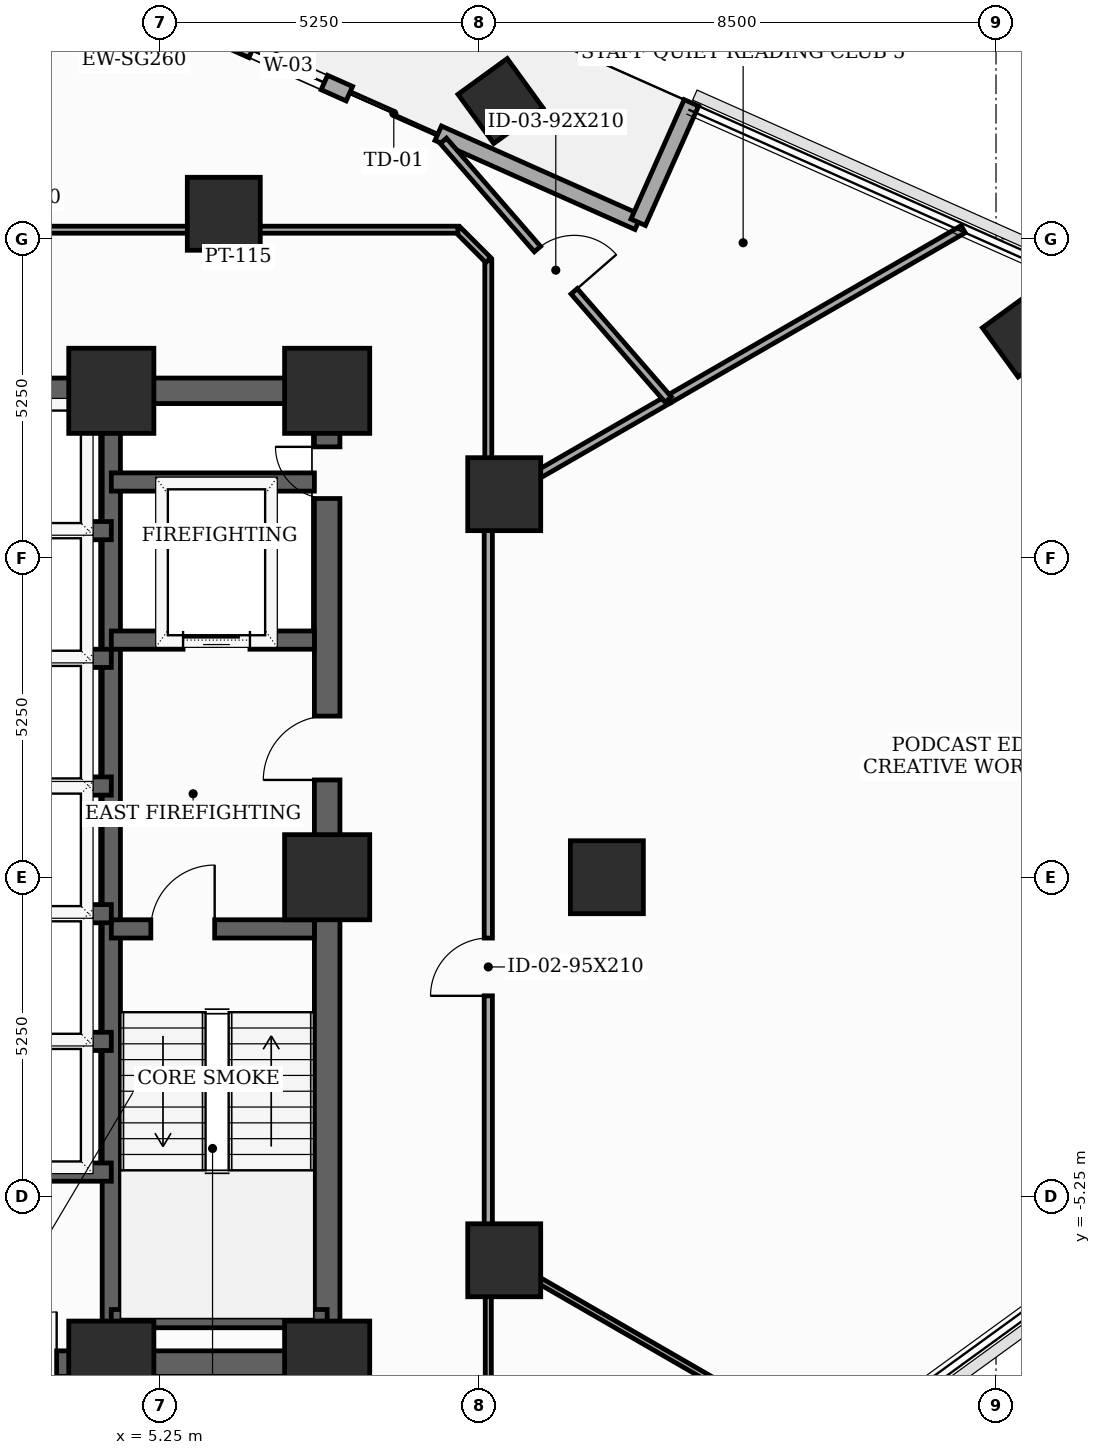
"""IFC4 building model, lengths in metres.
Left out: names, types, materials, properties, quantities, classifications, styles, units other than length and angle.
Written with IfcOpenShell. Run it as: python <this file> out.ifc"""

import sys

from ifc_helpers import new_model, si_unit, direction, frame, frame_2d, origin, origin_2d, place, context, subcontext, project, spatial, rectangle, extrude, element, fill, save


model = new_model("IFC4")
c1 = context("Model", 3, precision=1e-05, world=origin(), true_north=direction((0.0, 1.0)))
c2 = subcontext(c1, "Body", "Model", "MODEL_VIEW")
j1 = project(units=[si_unit("LENGTHUNIT", "METRE"), si_unit("PLANEANGLEUNIT", "RADIAN")], contexts=[c1])
p1 = place(None, origin())
s1 = spatial("IfcSite", under=j1, at=p1, CompositionType="ELEMENT")
p2 = place(p1, origin())
s2 = spatial("IfcBuilding", under=s1, at=p2, CompositionType="ELEMENT")
p3 = place(p2, frame((0.0, 0.0, 176.8)))
s3 = spatial("IfcBuildingStorey", under=s2, at=p3, CompositionType="ELEMENT", Elevation=176.8)
for number, where, z_axis, x_axis in (
    (1, (4.45, -8.0, 0.0), (0.0, 0.0, 1.0), (1.0, 0.0, 0.0)),
    (2, (8.0, -8.0, 0.0), (0.0, 0.0, 1.0), (1.0, 0.0, 0.0)),
    (3, (8.0, 0.0, 0.0), (0.0, 0.0, 1.0), (1.0, 0.0, 0.0)),
    (4, (8.0, 8.0, 0.0), (0.0, 0.0, 1.0), (1.0, 0.0, 0.0)),
    (5, (4.45, 8.0, 0.0), (0.0, 0.0, 1.0), (1.0, 0.0, 0.0)),
):
    element("IfcColumn", number, at=place(p3, frame(where, z_axis=z_axis, x_axis=x_axis)), inside=s3, PredefinedType="COLUMN", context=c2, shape_type="SweptSolid", body=[
        extrude(rectangle(XDim=1.4, YDim=1.4, at=origin_2d()), origin(), (0.0, 0.0, 1.0), 3.7),
    ])
for number, where, z_axis, x_axis in (
    (6, (12.6, 0.0, 0.0), (0.0, 0.0, 1.0), (1.0, 0.0, 0.0)),
    (7, (10.912, 6.3, 0.0), (0.0, 0.0, 1.0), (1.0, 0.0, 0.0)),
    (8, (6.3, 10.912, 0.0), (0.0, 0.0, 1.0), (1.0, 0.0, 0.0)),
    (9, (10.912, -6.3, 0.0), (0.0, 0.0, 1.0), (1.0, 0.0, 0.0)),
):
    element("IfcColumn", number, at=place(p3, frame(where, z_axis=z_axis, x_axis=x_axis)), inside=s3, PredefinedType="COLUMN", context=c2, shape_type="SweptSolid", body=[
        extrude(rectangle(XDim=1.2, YDim=1.2, at=origin_2d()), origin(), (0.0, 0.0, 1.0), 3.7),
    ])
for number, where, z_axis, x_axis in (
    (10, (19.474, 8.926, 0.0), (0.0, 0.0, 1.0), (0.809, 0.588, 0.0)),
    (11, (10.85, 12.766, 0.0), (0.0, 0.0, 1.0), (0.809, 0.588, 0.0)),
):
    element("IfcColumn", number, at=place(p3, frame(where, z_axis=z_axis, x_axis=x_axis)), inside=s3, PredefinedType="COLUMN", context=c2, shape_type="SweptSolid", body=[
        extrude(rectangle(XDim=1.0, YDim=1.0, at=origin_2d()), origin(), (0.0, 0.0, 1.0), 3.7),
    ])
p4 = place(p3, frame((13.115, 10.772, 0.0), z_axis=(0.0, 0.0, 1.0), x_axis=(-0.913545683247, 0.406736136359, 0.0)))
e12 = element("IfcWall", 12, at=p4, inside=s3, PredefinedType="SOLIDWALL", context=c2, shape_type="SweptSolid", body=[
    extrude(rectangle(XDim=10.8, YDim=0.26, at=frame_2d((5.4, 0.0))), origin(), (0.0, 0.0, 1.0), 3.5),
])
p5 = place(p4, frame((3.6, 0.0, 0.0)))
e13 = element("IfcOpeningElement", 13, at=p5, cuts=e12, PredefinedType="OPENING", context=c2, shape_type="SweptSolid", body=[
    extrude(rectangle(XDim=1.6, YDim=2.08, at=frame_2d((0.8, 1.04))), frame((0.0, 0.14, 0.0), z_axis=(0.0, -1.0, 0.0), x_axis=(1.0, 0.0, 0.0)), (0.0, 0.0, 1.0), 0.28),
])
p6 = place(p4, frame((5.65, 0.0, 0.85)))
e14 = element("IfcOpeningElement", 14, at=p6, cuts=e12, PredefinedType="OPENING", context=c2, shape_type="SweptSolid", body=[
    extrude(rectangle(XDim=1.3, YDim=1.25, at=frame_2d((0.65, 0.625))), frame((0.0, 0.14, 0.0), z_axis=(0.0, -1.0, 0.0), x_axis=(1.0, 0.0, 0.0)), (0.0, 0.0, 1.0), 0.28),
])
p7 = place(p3, frame((13.99, 12.736, 0.0), z_axis=(0.0, 0.0, 1.0), x_axis=(-0.406654684815, -0.913581943406, 0.0)))
e15 = element("IfcWall", 15, at=p7, inside=s3, PredefinedType="SOLIDWALL", context=c2, shape_type="SweptSolid", body=[
    extrude(rectangle(XDim=2.15, YDim=0.26, at=frame_2d((1.075, 0.0))), origin(), (0.0, 0.0, 1.0), 3.5),
])
p8 = place(p3, frame((8.0, -8.0, 0.0), z_axis=(0.0, 0.0, 1.0), x_axis=(0.0, 1.0, 0.0)))
e16 = element("IfcWall", 16, at=p8, inside=s3, PredefinedType="SHEAR", context=c2, shape_type="SweptSolid", body=[
    extrude(rectangle(XDim=16.0, YDim=0.42, at=frame_2d((8.0, 0.0))), origin(), (0.0, 0.0, 1.0), 3.5),
])
p9 = place(p8, frame((9.6, 0.0, 0.0)))
e17 = element("IfcOpeningElement", 17, at=p9, cuts=e16, PredefinedType="OPENING", context=c2, shape_type="SweptSolid", body=[
    extrude(rectangle(XDim=1.05, YDim=2.15, at=frame_2d((0.525, 1.075))), frame((0.0, 0.22, 0.0), z_axis=(0.0, -1.0, 0.0), x_axis=(1.0, 0.0, 0.0)), (0.0, 0.0, 1.0), 0.44),
])
p10 = place(p8, frame((14.229, 0.0, 0.0)))
e18 = element("IfcOpeningElement", 18, at=p10, cuts=e16, PredefinedType="OPENING", context=c2, shape_type="SweptSolid", body=[
    extrude(rectangle(XDim=0.85, YDim=2.02, at=frame_2d((0.425, 1.01))), frame((0.0, 0.22, 0.0), z_axis=(0.0, -1.0, 0.0), x_axis=(1.0, 0.0, 0.0)), (0.0, 0.0, 1.0), 0.44),
])
p11 = place(p3, frame((-8.0, -8.0, 0.0), z_axis=(0.0, 0.0, 1.0), x_axis=(1.0, 0.0, 0.0)))
e19 = element("IfcWall", 19, at=p11, inside=s3, PredefinedType="SHEAR", context=c2, shape_type="SweptSolid", body=[
    extrude(rectangle(XDim=16.0, YDim=0.42, at=frame_2d((8.0, 0.0))), origin(), (0.0, 0.0, 1.0), 3.5),
])
p12 = place(p11, frame((4.449, 0.0, 0.0)))
e20 = element("IfcOpeningElement", 20, at=p12, cuts=e19, PredefinedType="OPENING", context=c2, shape_type="SweptSolid", body=[
    extrude(rectangle(XDim=0.85, YDim=2.02, at=frame_2d((0.425, 1.01))), frame((0.0, 0.22, 0.0), z_axis=(0.0, -1.0, 0.0), x_axis=(1.0, 0.0, 0.0)), (0.0, 0.0, 1.0), 0.44),
])
p13 = place(p11, frame((6.49, 0.0, 0.0)))
e21 = element("IfcOpeningElement", 21, at=p13, cuts=e19, PredefinedType="OPENING", context=c2, shape_type="SweptSolid", body=[
    extrude(rectangle(XDim=0.85, YDim=2.02, at=frame_2d((0.425, 1.01))), frame((0.0, 0.22, 0.0), z_axis=(0.0, -1.0, 0.0), x_axis=(1.0, 0.0, 0.0)), (0.0, 0.0, 1.0), 0.44),
])
p14 = place(p11, frame((8.69, 0.0, 0.0)))
e22 = element("IfcOpeningElement", 22, at=p14, cuts=e19, PredefinedType="OPENING", context=c2, shape_type="SweptSolid", body=[
    extrude(rectangle(XDim=0.85, YDim=2.02, at=frame_2d((0.425, 1.01))), frame((0.0, 0.22, 0.0), z_axis=(0.0, -1.0, 0.0), x_axis=(1.0, 0.0, 0.0)), (0.0, 0.0, 1.0), 0.44),
])
p15 = place(p11, frame((10.701, 0.0, 0.0)))
e23 = element("IfcOpeningElement", 23, at=p15, cuts=e19, PredefinedType="OPENING", context=c2, shape_type="SweptSolid", body=[
    extrude(rectangle(XDim=0.85, YDim=2.02, at=frame_2d((0.425, 1.01))), frame((0.0, 0.22, 0.0), z_axis=(0.0, -1.0, 0.0), x_axis=(1.0, 0.0, 0.0)), (0.0, 0.0, 1.0), 0.44),
])
p16 = place(p3, frame((-8.0, 8.0, 0.0), z_axis=(0.0, 0.0, 1.0), x_axis=(1.0, 0.0, 0.0)))
e24 = element("IfcWall", 24, at=p16, inside=s3, PredefinedType="SHEAR", context=c2, shape_type="SweptSolid", body=[
    extrude(rectangle(XDim=16.0, YDim=0.42, at=frame_2d((8.0, 0.0))), origin(), (0.0, 0.0, 1.0), 3.5),
])
p17 = place(p16, frame((7.1, 0.0, 0.0)))
e25 = element("IfcOpeningElement", 25, at=p17, cuts=e24, PredefinedType="OPENING", context=c2, shape_type="SweptSolid", body=[
    extrude(rectangle(XDim=1.8, YDim=2.15, at=frame_2d((0.9, 1.075))), frame((0.0, 0.22, 0.0), z_axis=(0.0, -1.0, 0.0), x_axis=(1.0, 0.0, 0.0)), (0.0, 0.0, 1.0), 0.44),
])
p18 = place(p3, frame((4.45, -7.79, 0.0), z_axis=(0.0, 0.0, 1.0), x_axis=(0.0, 1.0, 0.0)))
e26 = element("IfcWall", 26, at=p18, inside=s3, PredefinedType="SHEAR", context=c2, shape_type="SweptSolid", body=[
    extrude(rectangle(XDim=15.58, YDim=0.3, at=frame_2d((7.79, 0.0))), origin(), (0.0, 0.0, 1.0), 3.5),
])
p19 = place(p3, frame((4.45, -0.85, 0.0), z_axis=(0.0, 0.0, 1.0), x_axis=(1.0, 0.0, 0.0)))
e27 = element("IfcWall", 27, at=p19, inside=s3, PredefinedType="SHEAR", context=c2, shape_type="SweptSolid", body=[
    extrude(rectangle(XDim=3.34, YDim=0.3, at=frame_2d((1.67, 0.0))), origin(), (0.0, 0.0, 1.0), 3.5),
])
p20 = place(p19, frame((0.65, 0.0, 0.0)))
e28 = element("IfcOpeningElement", 28, at=p20, cuts=e27, PredefinedType="OPENING", context=c2, shape_type="SweptSolid", body=[
    extrude(rectangle(XDim=1.05, YDim=2.15, at=frame_2d((0.525, 1.075))), frame((0.0, 0.16, 0.0), z_axis=(0.0, -1.0, 0.0), x_axis=(1.0, 0.0, 0.0)), (0.0, 0.0, 1.0), 0.32),
])
p21 = place(p3, frame((4.45, -7.26, 0.0), z_axis=(0.0, 0.0, 1.0), x_axis=(1.0, 0.0, 0.0)))
e29 = element("IfcWall", 29, at=p21, inside=s3, PredefinedType="SHEAR", context=c2, shape_type="SweptSolid", body=[
    extrude(rectangle(XDim=3.55, YDim=0.3, at=frame_2d((1.775, 0.0))), origin(), (0.0, 0.0, 1.0), 3.5),
])
p22 = place(p3, frame((4.45, 3.9, 0.0), z_axis=(0.0, 0.0, 1.0), x_axis=(1.0, 0.0, 0.0)))
e30 = element("IfcWall", 30, at=p22, inside=s3, PredefinedType="SHEAR", context=c2, shape_type="SweptSolid", body=[
    extrude(rectangle(XDim=3.34, YDim=0.3, at=frame_2d((1.67, 0.0))), origin(), (0.0, 0.0, 1.0), 3.5),
])
p23 = place(p22, frame((1.18, 0.0, 0.0)))
e31 = element("IfcOpeningElement", 31, at=p23, cuts=e30, PredefinedType="OPENING", context=c2, shape_type="SweptSolid", body=[
    extrude(rectangle(XDim=1.1, YDim=2.1, at=frame_2d((0.55, 1.05))), frame((0.0, 0.16, 0.0), z_axis=(0.0, -1.0, 0.0), x_axis=(1.0, 0.0, 0.0)), (0.0, 0.0, 1.0), 0.32),
])
p24 = place(p3, frame((4.45, 6.5, 0.0), z_axis=(0.0, 0.0, 1.0), x_axis=(1.0, 0.0, 0.0)))
e32 = element("IfcWall", 32, at=p24, inside=s3, PredefinedType="SHEAR", context=c2, shape_type="SweptSolid", body=[
    extrude(rectangle(XDim=3.34, YDim=0.3, at=frame_2d((1.67, 0.0))), origin(), (0.0, 0.0, 1.0), 3.5),
])
p25 = place(p3, frame((-4.45, -4.85, 0.0), z_axis=(0.0, 0.0, 1.0), x_axis=(1.0, 0.0, 0.0)))
e33 = element("IfcWall", 33, at=p25, inside=s3, PredefinedType="SHEAR", context=c2, shape_type="SweptSolid", body=[
    extrude(rectangle(XDim=8.9, YDim=0.3, at=frame_2d((4.45, 0.0))), origin(), (0.0, 0.0, 1.0), 3.5),
])
for number, where, z_axis, x_axis in (
    (34, (1.68, 1.5, 0.0), (0.0, 0.0, 1.0), (1.0, 0.0, 0.0)),
    (35, (1.68, 3.6, 0.0), (0.0, 0.0, 1.0), (1.0, 0.0, 0.0)),
    (36, (1.68, 5.7, 0.0), (0.0, 0.0, 1.0), (1.0, 0.0, 0.0)),
    (37, (1.68, -2.7, 0.0), (0.0, 0.0, 1.0), (1.0, 0.0, 0.0)),
    (38, (1.68, -0.6, 0.0), (0.0, 0.0, 1.0), (1.0, 0.0, 0.0)),
):
    element("IfcWall", number, at=place(p3, frame(where, z_axis=z_axis, x_axis=x_axis)), inside=s3, PredefinedType="SHEAR", context=c2, shape_type="SweptSolid", body=[
        extrude(rectangle(XDim=2.77, YDim=0.3, at=frame_2d((1.385, 0.0))), origin(), (0.0, 0.0, 1.0), 3.5),
    ])
p26 = place(p3, frame((10.65, -10.15, 0.0), z_axis=(0.0, 0.0, 1.0), x_axis=(0.0, 1.0, 0.0)))
e39 = element("IfcWall", 39, at=p26, inside=s3, PredefinedType="MOVABLE", context=c2, shape_type="SweptSolid", body=[
    extrude(rectangle(XDim=4.001, YDim=0.1, at=frame_2d((2.0, 0.0))), origin(), (0.0, 0.0, 1.0), 2.885),
])
p27 = place(p26, frame((0.66, 0.0, 0.0)))
e40 = element("IfcOpeningElement", 40, at=p27, cuts=e39, PredefinedType="OPENING", context=c2, shape_type="SweptSolid", body=[
    extrude(rectangle(XDim=0.92, YDim=2.1, at=frame_2d((0.46, 1.05))), frame((0.0, 0.06, 0.0), z_axis=(0.0, -1.0, 0.0), x_axis=(1.0, 0.0, 0.0)), (0.0, 0.0, 1.0), 0.12),
])
p28 = place(p3, frame((10.65, -6.149, 0.0), z_axis=(0.0, 0.0, 1.0), x_axis=(0.0, 1.0, 0.0)))
e41 = element("IfcWall", 41, at=p28, inside=s3, PredefinedType="PARTITIONING", context=c2, shape_type="SweptSolid", body=[
    extrude(rectangle(XDim=12.298, YDim=0.135, at=frame_2d((6.149, 0.0))), origin(), (0.0, 0.0, 1.0), 2.885),
])
p29 = place(p28, frame((4.198, 0.0, 0.0)))
e42 = element("IfcOpeningElement", 42, at=p29, cuts=e41, PredefinedType="OPENING", context=c2, shape_type="SweptSolid", body=[
    extrude(rectangle(XDim=0.95, YDim=2.1, at=frame_2d((0.475, 1.05))), frame((0.0, 0.077, 0.0), z_axis=(0.0, -1.0, 0.0), x_axis=(1.0, 0.0, 0.0)), (0.0, 0.0, 1.0), 0.155),
])
p30 = place(p3, frame((10.65, 6.149, 0.0), z_axis=(0.0, 0.0, 1.0), x_axis=(0.0, 1.0, 0.0)))
e43 = element("IfcWall", 43, at=p30, inside=s3, PredefinedType="PARTITIONING", context=c2, shape_type="SweptSolid", body=[
    extrude(rectangle(XDim=4.001, YDim=0.115, at=frame_2d((2.0, 0.0))), origin(), (0.0, 0.0, 1.0), 2.885),
])
p31 = place(p3, frame((10.65, 10.15, 0.0), z_axis=(0.0, 0.0, 1.0), x_axis=(-0.707106781187, 0.707106781187, 0.0)))
e44 = element("IfcWall", 44, at=p31, inside=s3, PredefinedType="PARTITIONING", context=c2, shape_type="SweptSolid", body=[
    extrude(rectangle(XDim=0.707, YDim=0.115, at=frame_2d((0.354, 0.0))), origin(), (0.0, 0.0, 1.0), 3.5),
])
p32 = place(p3, frame((10.15, 10.65, 0.0), z_axis=(0.0, 0.0, 1.0), x_axis=(-1.0, 0.0, 0.0)))
e45 = element("IfcWall", 45, at=p32, inside=s3, PredefinedType="PARTITIONING", context=c2, shape_type="SweptSolid", body=[
    extrude(rectangle(XDim=12.414, YDim=0.115, at=frame_2d((6.207, 0.0))), origin(), (0.0, 0.0, 1.0), 2.885),
])
p33 = place(p32, frame((7.222, 0.0, 0.0)))
e46 = element("IfcOpeningElement", 46, at=p33, cuts=e45, PredefinedType="OPENING", context=c2, shape_type="SweptSolid", body=[
    extrude(rectangle(XDim=0.95, YDim=2.1, at=frame_2d((0.475, 1.05))), frame((0.0, 0.067, 0.0), z_axis=(0.0, -1.0, 0.0), x_axis=(1.0, 0.0, 0.0)), (0.0, 0.0, 1.0), 0.135),
])
p34 = place(p3, frame((16.348, -9.439, 0.0), z_axis=(0.0, 0.0, 1.0), x_axis=(-0.866015045157, 0.50001794124, 0.0)))
e47 = element("IfcWall", 47, at=p34, inside=s3, PredefinedType="MOVABLE", context=c2, shape_type="SweptSolid", body=[
    extrude(rectangle(XDim=6.58, YDim=0.1, at=frame_2d((3.29, 0.0))), origin(), (0.0, 0.0, 1.0), 2.885),
])
p35 = place(p3, frame((18.46, 10.658, 0.0), z_axis=(0.0, 0.0, 1.0), x_axis=(-0.865978736514, -0.500080821373, 0.0)))
e48 = element("IfcWall", 48, at=p35, inside=s3, PredefinedType="PARTITIONING", context=c2, shape_type="SweptSolid", body=[
    extrude(rectangle(XDim=5.602, YDim=0.135, at=frame_2d((2.801, 0.0))), origin(), (0.0, 0.0, 1.0), 2.985),
])
p36 = place(p3, frame((13.609, 7.857, 0.0), z_axis=(0.0, 0.0, 1.0), x_axis=(-0.866071357471, -0.499920397431, 0.0)))
e49 = element("IfcWall", 49, at=p36, inside=s3, PredefinedType="PARTITIONING", context=c2, shape_type="SweptSolid", body=[
    extrude(rectangle(XDim=3.417, YDim=0.135, at=frame_2d((1.708, 0.0))), origin(), (0.0, 0.0, 1.0), 2.885),
])
p37 = place(p3, frame((9.911, 12.111, 0.0), z_axis=(0.0, 0.0, 1.0), x_axis=(0.656029654943, -0.754735113689, 0.0)))
e50 = element("IfcWall", 50, at=p37, inside=s3, PredefinedType="PARTITIONING", context=c2, shape_type="SweptSolid", body=[
    extrude(rectangle(XDim=5.637, YDim=0.135, at=frame_2d((2.818, 0.0))), origin(), (0.0, 0.0, 1.0), 3.5),
])
p38 = place(p37, frame((2.358, 0.0, 0.0)))
e51 = element("IfcOpeningElement", 51, at=p38, cuts=e50, PredefinedType="OPENING", context=c2, shape_type="SweptSolid", body=[
    extrude(rectangle(XDim=0.92, YDim=2.1, at=frame_2d((0.46, 1.05))), frame((0.0, 0.077, 0.0), z_axis=(0.0, -1.0, 0.0), x_axis=(1.0, 0.0, 0.0)), (0.0, 0.0, 1.0), 0.155),
])
p39 = place(p5, frame((1.6, 0.0, 0.0), z_axis=(0.0, 0.0, 1.0), x_axis=(-1.0, 0.0, 0.0)))
e52 = element("IfcDoor", 52, at=p39, inside=s3, OperationType="DOUBLE_DOOR_SLIDING", PredefinedType="DOOR", context=c2, shape_type="SweptSolid", body=[
    extrude(rectangle(XDim=1.6, YDim=2.08, at=frame_2d((0.8, 1.04))), frame((0.0, 0.025, 0.0), z_axis=(0.0, -1.0, 0.0), x_axis=(1.0, 0.0, 0.0)), (0.0, 0.0, 1.0), 0.05),
])
fill(e13, e52)
p40 = place(p6, origin())
e53 = element("IfcWindow", 53, at=p40, inside=s3, PartitioningType="SINGLE_PANEL", PredefinedType="WINDOW", context=c2, shape_type="SweptSolid", body=[
    extrude(rectangle(XDim=1.3, YDim=1.25, at=frame_2d((0.65, 0.625))), frame((0.0, 0.03, 0.0), z_axis=(0.0, -1.0, 0.0), x_axis=(1.0, 0.0, 0.0)), (0.0, 0.0, 1.0), 0.06),
])
fill(e14, e53)
p41 = place(p9, origin())
e54 = element("IfcDoor", 54, at=p41, inside=s3, OperationType="SINGLE_SWING_LEFT", PredefinedType="DOOR", context=c2, shape_type="SweptSolid", body=[
    extrude(rectangle(XDim=1.05, YDim=2.15, at=frame_2d((0.525, 1.075))), frame((0.0, 0.025, 0.0), z_axis=(0.0, -1.0, 0.0), x_axis=(1.0, 0.0, 0.0)), (0.0, 0.0, 1.0), 0.05),
])
fill(e17, e54)
p42 = place(p10, origin())
e55 = element("IfcDoor", 55, at=p42, inside=s3, OperationType="SINGLE_SWING_RIGHT", PredefinedType="TRAPDOOR", context=c2, shape_type="SweptSolid", body=[
    extrude(rectangle(XDim=0.85, YDim=2.02, at=frame_2d((0.425, 1.01))), frame((0.0, 0.025, 0.0), z_axis=(0.0, -1.0, 0.0), x_axis=(1.0, 0.0, 0.0)), (0.0, 0.0, 1.0), 0.05),
])
fill(e18, e55)
p43 = place(p15, origin())
e56 = element("IfcDoor", 56, at=p43, inside=s3, OperationType="SINGLE_SWING_RIGHT", PredefinedType="TRAPDOOR", context=c2, shape_type="SweptSolid", body=[
    extrude(rectangle(XDim=0.85, YDim=2.02, at=frame_2d((0.425, 1.01))), frame((0.0, 0.025, 0.0), z_axis=(0.0, -1.0, 0.0), x_axis=(1.0, 0.0, 0.0)), (0.0, 0.0, 1.0), 0.05),
])
fill(e23, e56)
p44 = place(p20, origin())
e57 = element("IfcDoor", 57, at=p44, inside=s3, OperationType="SINGLE_SWING_RIGHT", PredefinedType="DOOR", context=c2, shape_type="SweptSolid", body=[
    extrude(rectangle(XDim=1.05, YDim=2.15, at=frame_2d((0.525, 1.075))), frame((0.0, 0.025, 0.0), z_axis=(0.0, -1.0, 0.0), x_axis=(1.0, 0.0, 0.0)), (0.0, 0.0, 1.0), 0.05),
])
fill(e28, e57)
p45 = place(p23, origin())
e58 = element("IfcDoor", 58, at=p45, inside=s3, OperationType="SLIDING_TO_LEFT", PredefinedType="DOOR", context=c2, shape_type="SweptSolid", body=[
    extrude(rectangle(XDim=1.1, YDim=2.1, at=frame_2d((0.55, 1.05))), frame((0.0, 0.025, 0.0), z_axis=(0.0, -1.0, 0.0), x_axis=(1.0, 0.0, 0.0)), (0.0, 0.0, 1.0), 0.05),
])
fill(e31, e58)
p46 = place(p29, origin())
e59 = element("IfcDoor", 59, at=p46, inside=s3, OperationType="SINGLE_SWING_LEFT", PredefinedType="DOOR", context=c2, shape_type="SweptSolid", body=[
    extrude(rectangle(XDim=0.95, YDim=2.1, at=frame_2d((0.475, 1.05))), frame((0.0, 0.025, 0.0), z_axis=(0.0, -1.0, 0.0), x_axis=(1.0, 0.0, 0.0)), (0.0, 0.0, 1.0), 0.05),
])
fill(e42, e59)
p47 = place(p38, origin())
e60 = element("IfcDoor", 60, at=p47, inside=s3, OperationType="SINGLE_SWING_RIGHT", PredefinedType="DOOR", context=c2, shape_type="SweptSolid", body=[
    extrude(rectangle(XDim=0.92, YDim=2.1, at=frame_2d((0.46, 1.05))), frame((0.0, 0.025, 0.0), z_axis=(0.0, -1.0, 0.0), x_axis=(1.0, 0.0, 0.0)), (0.0, 0.0, 1.0), 0.05),
])
fill(e51, e60)
save(model, sys.argv[1])
